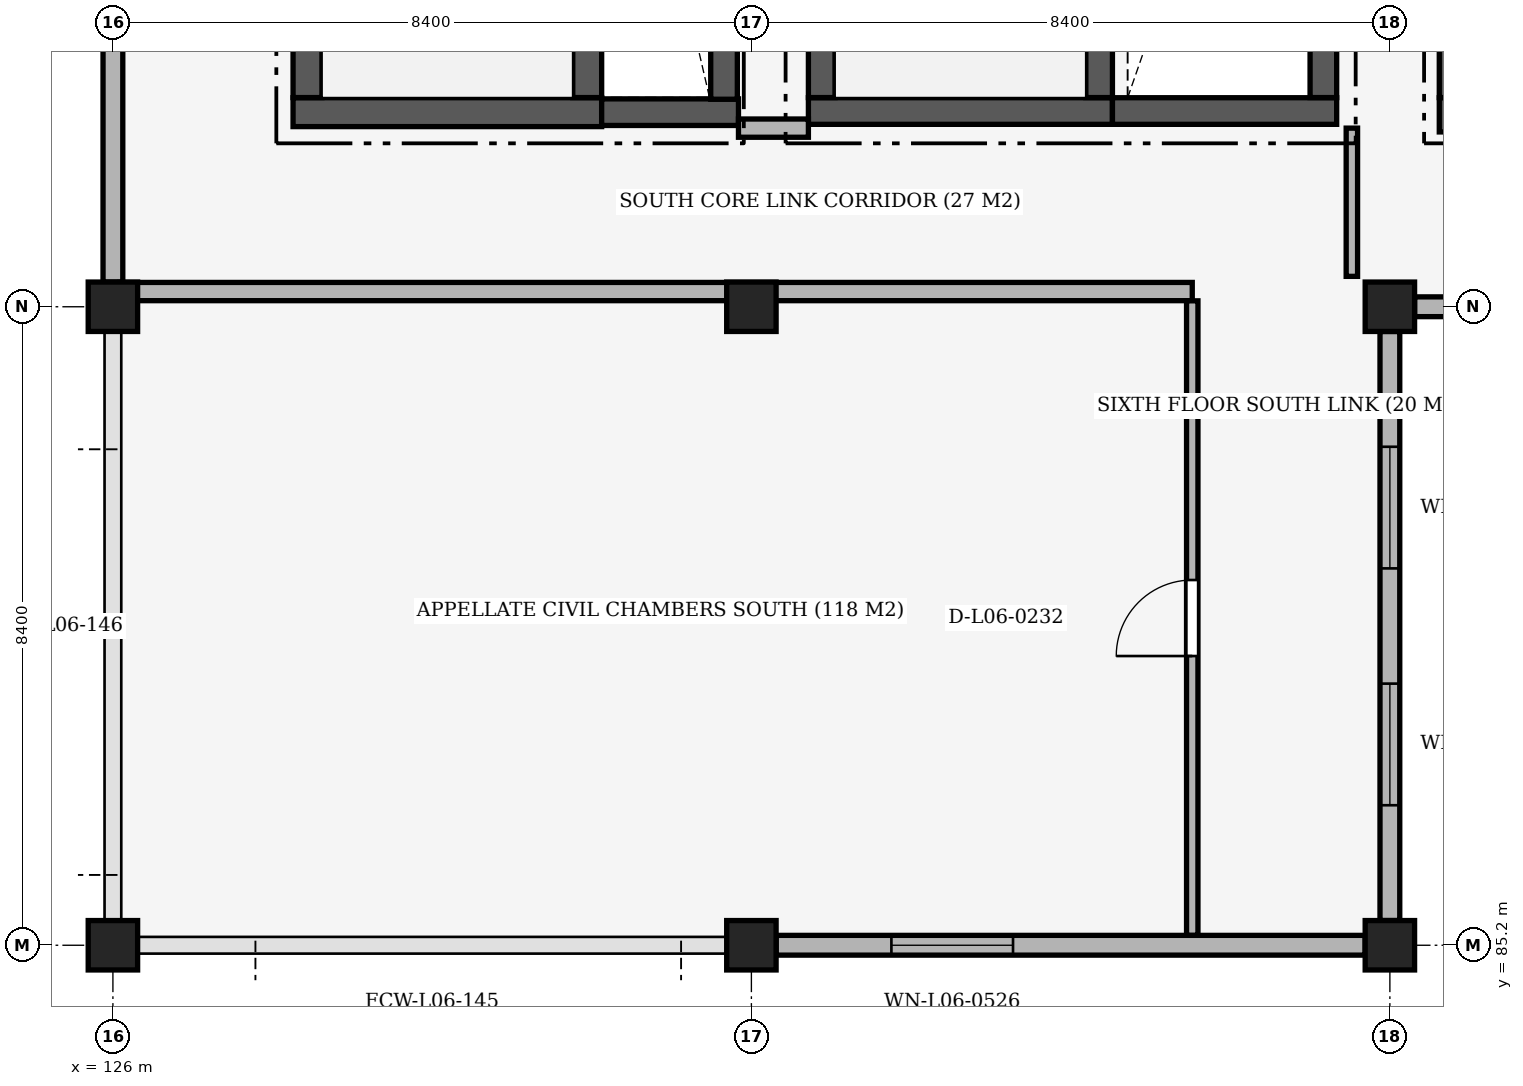
"""IFC4 building model, lengths in metres.
Left out: names, types, materials, properties, quantities, classifications, styles, units other than length and angle.
Written with IfcOpenShell. Run it as: python <this file> out.ifc"""

import sys

from ifc_helpers import new_model, si_unit, direction, frame, frame_2d, origin, origin_2d, place, context, subcontext, project, spatial, rectangle, extrude, element, fill, save


model = new_model("IFC4")
c1 = context("Model", 3, precision=1e-05, world=origin(), true_north=direction((0.0, 1.0)))
c2 = subcontext(c1, "Body", "Model", "MODEL_VIEW")
j1 = project(units=[si_unit("LENGTHUNIT", "METRE"), si_unit("PLANEANGLEUNIT", "RADIAN")], contexts=[c1])
p1 = place(None, origin())
s1 = spatial("IfcSite", under=j1, at=p1, CompositionType="ELEMENT")
p2 = place(p1, origin())
s2 = spatial("IfcBuilding", under=s1, at=p2, CompositionType="ELEMENT")
p3 = place(p2, frame((0.0, 0.0, 29.4)))
s3 = spatial("IfcBuildingStorey", under=s2, at=p3, CompositionType="ELEMENT", Elevation=29.4)
for number, where, z_axis, x_axis in (
    (1, (126.0, 85.2, 0.0), (0.0, 0.0, 1.0), (1.0, 0.0, 0.0)),
    (2, (126.0, 93.6, 0.0), (0.0, 0.0, 1.0), (1.0, 0.0, 0.0)),
    (3, (134.4, 85.2, 0.0), (0.0, 0.0, 1.0), (1.0, 0.0, 0.0)),
    (4, (134.4, 93.6, 0.0), (0.0, 0.0, 1.0), (1.0, 0.0, 0.0)),
    (5, (142.8, 85.2, 0.0), (0.0, 0.0, 1.0), (1.0, 0.0, 0.0)),
    (6, (142.8, 93.6, 0.0), (0.0, 0.0, 1.0), (1.0, 0.0, 0.0)),
):
    element("IfcColumn", number, at=place(p3, frame(where, z_axis=z_axis, x_axis=x_axis)), inside=s3, PredefinedType="COLUMN", context=c2, shape_type="SweptSolid", body=[
        extrude(rectangle(XDim=0.65, YDim=0.65, at=origin_2d()), origin(), (0.0, 0.0, 1.0), 4.2),
    ])
p4 = place(p3, frame((142.475, 85.2, 0.0), z_axis=(0.0, 0.0, 1.0), x_axis=(-1.0, 0.0, 0.0)))
e7 = element("IfcWall", 7, at=p4, inside=s3, PredefinedType="SOLIDWALL", context=c2, shape_type="SweptSolid", body=[
    extrude(rectangle(XDim=7.75, YDim=0.26, at=frame_2d((3.875, 0.0))), origin(), (0.0, 0.0, 1.0), 3.25),
])
p5 = place(p4, frame((4.633, 0.0, 1.05)))
e8 = element("IfcOpeningElement", 8, at=p5, cuts=e7, PredefinedType="OPENING", context=c2, shape_type="SweptSolid", body=[
    extrude(rectangle(XDim=1.6, YDim=1.8, at=frame_2d((0.8, 0.9))), frame((0.0, 0.145, 0.0), z_axis=(0.0, -1.0, 0.0), x_axis=(1.0, 0.0, 0.0)), (0.0, 0.0, 1.0), 0.29),
])
p6 = place(p3, frame((126.0, 93.925, 0.0), z_axis=(0.0, 0.0, 1.0), x_axis=(0.0, 1.0, 0.0)))
e9 = element("IfcWall", 9, at=p6, inside=s3, PredefinedType="SOLIDWALL", context=c2, shape_type="SweptSolid", body=[
    extrude(rectangle(XDim=5.325, YDim=0.26, at=frame_2d((2.663, 0.0))), origin(), (0.0, 0.0, 1.0), 3.4),
])
p7 = place(p3, frame((150.875, 93.6, 0.0), z_axis=(0.0, 0.0, 1.0), x_axis=(-1.0, 0.0, 0.0)))
e10 = element("IfcWall", 10, at=p7, inside=s3, PredefinedType="SOLIDWALL", context=c2, shape_type="SweptSolid", body=[
    extrude(rectangle(XDim=7.75, YDim=0.26, at=frame_2d((3.875, 0.0))), origin(), (0.0, 0.0, 1.0), 3.25),
])
p8 = place(p7, frame((1.517, 0.0, 1.05)))
e11 = element("IfcOpeningElement", 11, at=p8, cuts=e10, PredefinedType="OPENING", context=c2, shape_type="SweptSolid", body=[
    extrude(rectangle(XDim=1.6, YDim=1.8, at=frame_2d((0.8, 0.9))), frame((0.0, 0.145, 0.0), z_axis=(0.0, -1.0, 0.0), x_axis=(1.0, 0.0, 0.0)), (0.0, 0.0, 1.0), 0.29),
])
p9 = place(p7, frame((4.633, 0.0, 1.05)))
e12 = element("IfcOpeningElement", 12, at=p9, cuts=e10, PredefinedType="OPENING", context=c2, shape_type="SweptSolid", body=[
    extrude(rectangle(XDim=1.6, YDim=1.8, at=frame_2d((0.8, 0.9))), frame((0.0, 0.145, 0.0), z_axis=(0.0, -1.0, 0.0), x_axis=(1.0, 0.0, 0.0)), (0.0, 0.0, 1.0), 0.29),
])
p10 = place(p3, frame((142.8, 93.275, 0.0), z_axis=(0.0, 0.0, 1.0), x_axis=(0.0, -1.0, 0.0)))
e13 = element("IfcWall", 13, at=p10, inside=s3, PredefinedType="SOLIDWALL", context=c2, shape_type="SweptSolid", body=[
    extrude(rectangle(XDim=7.75, YDim=0.26, at=frame_2d((3.875, 0.0))), origin(), (0.0, 0.0, 1.0), 3.25),
])
p11 = place(p10, frame((1.517, 0.0, 1.05)))
e14 = element("IfcOpeningElement", 14, at=p11, cuts=e13, PredefinedType="OPENING", context=c2, shape_type="SweptSolid", body=[
    extrude(rectangle(XDim=1.6, YDim=1.8, at=frame_2d((0.8, 0.9))), frame((0.0, 0.145, 0.0), z_axis=(0.0, -1.0, 0.0), x_axis=(1.0, 0.0, 0.0)), (0.0, 0.0, 1.0), 0.29),
])
p12 = place(p10, frame((4.633, 0.0, 1.05)))
e15 = element("IfcOpeningElement", 15, at=p12, cuts=e13, PredefinedType="OPENING", context=c2, shape_type="SweptSolid", body=[
    extrude(rectangle(XDim=1.6, YDim=1.8, at=frame_2d((0.8, 0.9))), frame((0.0, 0.145, 0.0), z_axis=(0.0, -1.0, 0.0), x_axis=(1.0, 0.0, 0.0)), (0.0, 0.0, 1.0), 0.29),
])
p13 = place(p3, frame((128.37, 96.16, 0.0), z_axis=(0.0, 0.0, 1.0), x_axis=(1.0, 0.0, 0.0)))
e16 = element("IfcWall", 16, at=p13, inside=s3, PredefinedType="SHEAR", context=c2, shape_type="SweptSolid", body=[
    extrude(rectangle(XDim=4.06, YDim=0.38, at=frame_2d((2.03, 0.0))), origin(), (0.0, 0.0, 1.0), 3.95),
])
for number, where, z_axis, x_axis in (
    (17, (128.56, 96.352, 0.0), (0.0, 0.0, 1.0), (0.0, 1.0, 0.0)),
    (18, (132.24, 96.352, 0.0), (0.0, 0.0, 1.0), (0.0, 1.0, 0.0)),
):
    element("IfcWall", number, at=place(p3, frame(where, z_axis=z_axis, x_axis=x_axis)), inside=s3, PredefinedType="SHEAR", context=c2, shape_type="SweptSolid", body=[
        extrude(rectangle(XDim=6.896, YDim=0.38, at=frame_2d((3.448, 0.0))), origin(), (0.0, 0.0, 1.0), 3.95),
    ])
p14 = place(p3, frame((132.43, 96.16, 0.0), z_axis=(0.0, 0.0, 1.0), x_axis=(1.0, 0.0, 0.0)))
e19 = element("IfcWall", 19, at=p14, inside=s3, PredefinedType="SHEAR", context=c2, shape_type="SweptSolid", body=[
    extrude(rectangle(XDim=1.8, YDim=0.35, at=frame_2d((0.9, 0.0))), origin(), (0.0, 0.0, 1.0), 3.95),
])
p15 = place(p3, frame((134.04, 96.33, 0.0), z_axis=(0.0, 0.0, 1.0), x_axis=(0.0, 1.0, 0.0)))
e20 = element("IfcWall", 20, at=p15, inside=s3, PredefinedType="SHEAR", context=c2, shape_type="SweptSolid", body=[
    extrude(rectangle(XDim=7.177, YDim=0.35, at=frame_2d((3.588, 0.0))), origin(), (0.0, 0.0, 1.0), 3.95),
])
p16 = place(p3, frame((135.15, 96.175, 0.0), z_axis=(0.0, 0.0, 1.0), x_axis=(1.0, 0.0, 0.0)))
e21 = element("IfcWall", 21, at=p16, inside=s3, PredefinedType="SHEAR", context=c2, shape_type="SweptSolid", body=[
    extrude(rectangle(XDim=4.0, YDim=0.35, at=frame_2d((2.0, 0.0))), origin(), (0.0, 0.0, 1.0), 3.95),
])
for number, where, z_axis, x_axis in (
    (22, (135.325, 96.352, 0.0), (0.0, 0.0, 1.0), (0.0, 1.0, 0.0)),
    (23, (138.975, 96.352, 0.0), (0.0, 0.0, 1.0), (0.0, 1.0, 0.0)),
):
    element("IfcWall", number, at=place(p3, frame(where, z_axis=z_axis, x_axis=x_axis)), inside=s3, PredefinedType="SHEAR", context=c2, shape_type="SweptSolid", body=[
        extrude(rectangle(XDim=6.896, YDim=0.35, at=frame_2d((3.448, 0.0))), origin(), (0.0, 0.0, 1.0), 3.95),
    ])
p17 = place(p3, frame((139.15, 96.175, 0.0), z_axis=(0.0, 0.0, 1.0), x_axis=(1.0, 0.0, 0.0)))
e24 = element("IfcWall", 24, at=p17, inside=s3, PredefinedType="SHEAR", context=c2, shape_type="SweptSolid", body=[
    extrude(rectangle(XDim=2.95, YDim=0.35, at=frame_2d((1.475, 0.0))), origin(), (0.0, 0.0, 1.0), 3.95),
])
p18 = place(p3, frame((141.925, 96.352, 0.0), z_axis=(0.0, 0.0, 1.0), x_axis=(0.0, 1.0, 0.0)))
e25 = element("IfcWall", 25, at=p18, inside=s3, PredefinedType="SHEAR", context=c2, shape_type="SweptSolid", body=[
    extrude(rectangle(XDim=7.155, YDim=0.35, at=frame_2d((3.578, 0.0))), origin(), (0.0, 0.0, 1.0), 3.95),
])
p19 = place(p3, frame((143.45, 96.125, 0.0), z_axis=(0.0, 0.0, 1.0), x_axis=(1.0, 0.0, 0.0)))
e26 = element("IfcWall", 26, at=p19, inside=s3, PredefinedType="SHEAR", context=c2, shape_type="SweptSolid", body=[
    extrude(rectangle(XDim=4.2, YDim=0.45, at=frame_2d((2.1, 0.0))), origin(), (0.0, 0.0, 1.0), 3.95),
])
p20 = place(p3, frame((143.675, 96.352, 0.0), z_axis=(0.0, 0.0, 1.0), x_axis=(0.0, 1.0, 0.0)))
e27 = element("IfcWall", 27, at=p20, inside=s3, PredefinedType="SHEAR", context=c2, shape_type="SweptSolid", body=[
    extrude(rectangle(XDim=6.896, YDim=0.45, at=frame_2d((3.448, 0.0))), origin(), (0.0, 0.0, 1.0), 3.95),
])
p21 = place(p3, frame((126.089, 93.8, 0.0), z_axis=(0.0, 0.0, 1.0), x_axis=(1.0, 0.0, 0.0)))
e28 = element("IfcWall", 28, at=p21, inside=s3, PredefinedType="PARTITIONING", context=c2, shape_type="SweptSolid", body=[
    extrude(rectangle(XDim=14.111, YDim=0.24, at=frame_2d((7.055, 0.0))), origin(), (0.0, 0.0, 1.0), 3.25),
])
p22 = place(p3, frame((134.23, 95.95, 0.0), z_axis=(0.0, 0.0, 1.0), x_axis=(1.0, 0.0, 0.0)))
e29 = element("IfcWall", 29, at=p22, inside=s3, PredefinedType="PARTITIONING", context=c2, shape_type="SweptSolid", body=[
    extrude(rectangle(XDim=0.92, YDim=0.24, at=frame_2d((0.46, 0.0))), origin(), (0.0, 0.0, 1.0), 3.4),
])
p23 = place(p3, frame((140.2, 85.332, 0.0), z_axis=(0.0, 0.0, 1.0), x_axis=(0.0, 1.0, 0.0)))
e30 = element("IfcWall", 30, at=p23, inside=s3, PredefinedType="PARTITIONING", context=c2, shape_type="SweptSolid", body=[
    extrude(rectangle(XDim=8.346, YDim=0.15, at=frame_2d((4.173, 0.0))), origin(), (0.0, 0.0, 1.0), 3.25),
])
p24 = place(p23, frame((3.673, 0.0, 0.0)))
e31 = element("IfcOpeningElement", 31, at=p24, cuts=e30, PredefinedType="OPENING", context=c2, shape_type="SweptSolid", body=[
    extrude(rectangle(XDim=1.0, YDim=2.2, at=frame_2d((0.5, 1.1))), frame((0.0, 0.09, 0.0), z_axis=(0.0, -1.0, 0.0), x_axis=(1.0, 0.0, 0.0)), (0.0, 0.0, 1.0), 0.18),
])
p25 = place(p3, frame((142.3, 94.0, 0.0), z_axis=(0.0, 0.0, 1.0), x_axis=(0.0, 1.0, 0.0)))
e32 = element("IfcWall", 32, at=p25, inside=s3, PredefinedType="PARTITIONING", context=c2, shape_type="SweptSolid", body=[
    extrude(rectangle(XDim=1.95, YDim=0.15, at=frame_2d((0.975, 0.0))), origin(), (0.0, 0.0, 1.0), 3.95),
])
p26 = place(p5, origin())
e33 = element("IfcWindow", 33, at=p26, inside=s3, PartitioningType="SINGLE_PANEL", PredefinedType="WINDOW", context=c2, shape_type="SweptSolid", body=[
    extrude(rectangle(XDim=1.6, YDim=1.8, at=frame_2d((0.8, 0.9))), frame((0.0, 0.03, 0.0), z_axis=(0.0, -1.0, 0.0), x_axis=(1.0, 0.0, 0.0)), (0.0, 0.0, 1.0), 0.06),
])
fill(e8, e33)
p27 = place(p11, origin())
e34 = element("IfcWindow", 34, at=p27, inside=s3, PartitioningType="SINGLE_PANEL", PredefinedType="WINDOW", context=c2, shape_type="SweptSolid", body=[
    extrude(rectangle(XDim=1.6, YDim=1.8, at=frame_2d((0.8, 0.9))), frame((0.0, 0.03, 0.0), z_axis=(0.0, -1.0, 0.0), x_axis=(1.0, 0.0, 0.0)), (0.0, 0.0, 1.0), 0.06),
])
fill(e14, e34)
p28 = place(p12, origin())
e35 = element("IfcWindow", 35, at=p28, inside=s3, PartitioningType="SINGLE_PANEL", PredefinedType="WINDOW", context=c2, shape_type="SweptSolid", body=[
    extrude(rectangle(XDim=1.6, YDim=1.8, at=frame_2d((0.8, 0.9))), frame((0.0, 0.03, 0.0), z_axis=(0.0, -1.0, 0.0), x_axis=(1.0, 0.0, 0.0)), (0.0, 0.0, 1.0), 0.06),
])
fill(e15, e35)
p29 = place(p24, origin())
e36 = element("IfcDoor", 36, at=p29, inside=s3, OperationType="SINGLE_SWING_LEFT", PredefinedType="DOOR", context=c2, shape_type="SweptSolid", body=[
    extrude(rectangle(XDim=1.0, YDim=2.2, at=frame_2d((0.5, 1.1))), frame((0.0, 0.025, 0.0), z_axis=(0.0, -1.0, 0.0), x_axis=(1.0, 0.0, 0.0)), (0.0, 0.0, 1.0), 0.05),
])
fill(e31, e36)
save(model, sys.argv[1])
